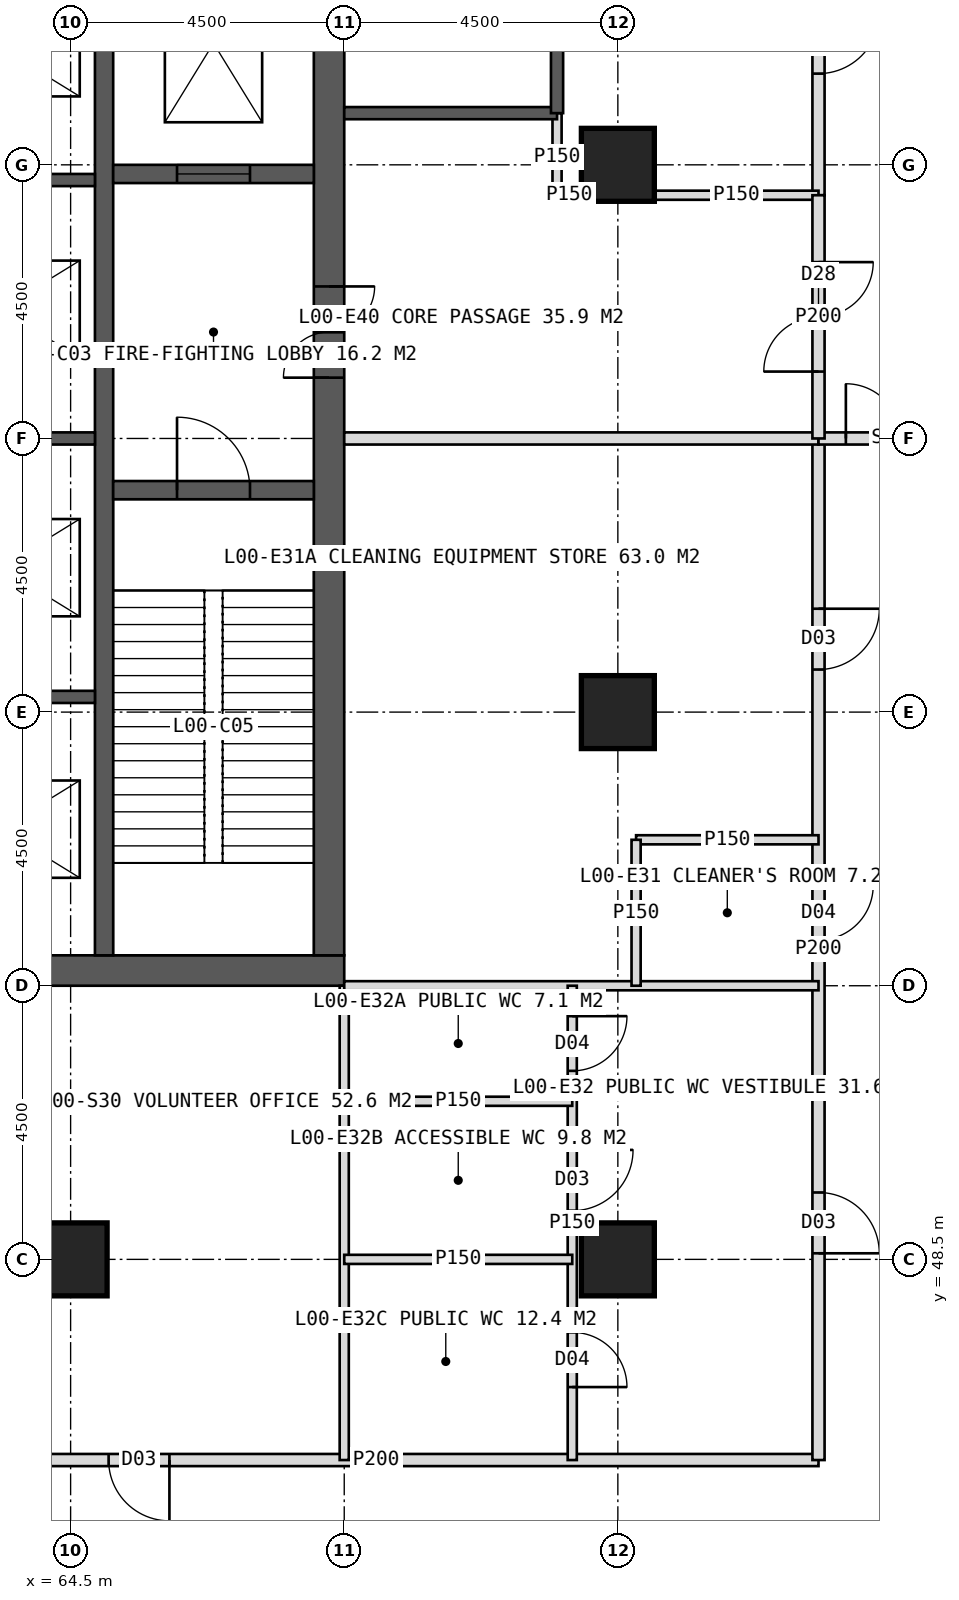
"""IFC4 building model, lengths in metres.
Left out: names, types, materials, properties, quantities, classifications, styles, units other than length and angle.
Written with IfcOpenShell. Run it as: python <this file> out.ifc"""

import sys

from ifc_helpers import new_model, si_unit, direction, frame, frame_2d, origin, origin_2d, place, context, subcontext, project, spatial, rectangle, hollow_rectangle, extrude, element, fill, save


model = new_model("IFC4")
c1 = context("Model", 3, precision=1e-05, world=origin(), true_north=direction((0.0, 1.0)))
c2 = subcontext(c1, "Body", "Model", "MODEL_VIEW")
j1 = project(units=[si_unit("LENGTHUNIT", "METRE"), si_unit("PLANEANGLEUNIT", "RADIAN")], contexts=[c1])
p1 = place(None, origin())
s1 = spatial("IfcSite", under=j1, at=p1, CompositionType="ELEMENT")
p2 = place(p1, origin())
s2 = spatial("IfcBuilding", under=s1, at=p2, CompositionType="ELEMENT")
p3 = place(p2, origin())
s3 = spatial("IfcBuildingStorey", under=s2, at=p3, CompositionType="ELEMENT", Elevation=0.0)
p4 = place(p3, frame((51.0, 53.25, 0.0), z_axis=(0.0, 0.0, 1.0), x_axis=(1.0, 0.0, 0.0)))
e1 = element("IfcWall", 1, at=p4, inside=s3, PredefinedType="SHEAR", context=c2, shape_type="SweptSolid", body=[
    extrude(rectangle(XDim=18.0, YDim=0.5, at=frame_2d((9.0, 0.0))), origin(), (0.0, 0.0, 1.0), 6.0),
])
p5 = place(p4, frame((8.1, 0.0, 0.0)))
e2 = element("IfcOpeningElement", 2, at=p5, cuts=e1, PredefinedType="OPENING", context=c2, shape_type="SweptSolid", body=[
    extrude(rectangle(XDim=1.8, YDim=2.2, at=frame_2d((0.9, 1.1))), frame((0.0, 0.26, 0.0), z_axis=(0.0, -1.0, 0.0), x_axis=(1.0, 0.0, 0.0)), (0.0, 0.0, 1.0), 0.52),
])
p6 = place(p3, frame((68.75, 53.5, 0.0), z_axis=(0.0, 0.0, 1.0), x_axis=(0.0, 1.0, 0.0)))
e3 = element("IfcWall", 3, at=p6, inside=s3, PredefinedType="SHEAR", context=c2, shape_type="SweptSolid", body=[
    extrude(rectangle(XDim=17.0, YDim=0.5, at=frame_2d((8.5, 0.0))), origin(), (0.0, 0.0, 1.0), 6.0),
])
p7 = place(p6, frame((9.5, 0.0, 0.0)))
e4 = element("IfcOpeningElement", 4, at=p7, cuts=e3, PredefinedType="OPENING", context=c2, shape_type="SweptSolid", body=[
    extrude(rectangle(XDim=1.5, YDim=2.2, at=frame_2d((0.75, 1.1))), frame((0.0, 0.26, 0.0), z_axis=(0.0, -1.0, 0.0), x_axis=(1.0, 0.0, 0.0)), (0.0, 0.0, 1.0), 0.52),
])
p8 = place(p3, frame((65.05, 53.5, 0.0), z_axis=(0.0, 0.0, 1.0), x_axis=(0.0, 1.0, 0.0)))
e5 = element("IfcWall", 5, at=p8, inside=s3, PredefinedType="SHEAR", context=c2, shape_type="SweptSolid", body=[
    extrude(rectangle(XDim=17.0, YDim=0.3, at=frame_2d((8.5, 0.0))), origin(), (0.0, 0.0, 1.0), 6.0),
])
for number, where, z_axis, x_axis in (
    (6, (61.85, 57.75, 0.0), (0.0, 0.0, 1.0), (1.0, 0.0, 0.0)),
    (7, (61.85, 62.0, 0.0), (0.0, 0.0, 1.0), (1.0, 0.0, 0.0)),
    (8, (61.85, 66.25, 0.0), (0.0, 0.0, 1.0), (1.0, 0.0, 0.0)),
):
    element("IfcWall", number, at=place(p3, frame(where, z_axis=z_axis, x_axis=x_axis)), inside=s3, PredefinedType="SHEAR", context=c2, shape_type="SweptSolid", body=[
        extrude(rectangle(XDim=3.05, YDim=0.2, at=frame_2d((1.525, 0.0))), origin(), (0.0, 0.0, 1.0), 6.0),
    ])
p9 = place(p3, frame((65.2, 61.15, 0.0), z_axis=(0.0, 0.0, 1.0), x_axis=(1.0, 0.0, 0.0)))
e9 = element("IfcWall", 9, at=p9, inside=s3, PredefinedType="SHEAR", context=c2, shape_type="SweptSolid", body=[
    extrude(rectangle(XDim=3.3, YDim=0.3, at=frame_2d((1.65, 0.0))), origin(), (0.0, 0.0, 1.0), 6.0),
])
p10 = place(p9, frame((1.05, 0.0, 0.0)))
e10 = element("IfcOpeningElement", 10, at=p10, cuts=e9, PredefinedType="OPENING", context=c2, shape_type="SweptSolid", body=[
    extrude(rectangle(XDim=1.2, YDim=2.1, at=frame_2d((0.6, 1.05))), frame((0.0, 0.16, 0.0), z_axis=(0.0, -1.0, 0.0), x_axis=(1.0, 0.0, 0.0)), (0.0, 0.0, 1.0), 0.32),
])
p11 = place(p3, frame((65.2, 66.35, 0.0), z_axis=(0.0, 0.0, 1.0), x_axis=(1.0, 0.0, 0.0)))
e11 = element("IfcWall", 11, at=p11, inside=s3, PredefinedType="SHEAR", context=c2, shape_type="SweptSolid", body=[
    extrude(rectangle(XDim=3.3, YDim=0.3, at=frame_2d((1.65, 0.0))), origin(), (0.0, 0.0, 1.0), 6.0),
])
p12 = place(p11, frame((1.05, 0.0, 0.0)))
e12 = element("IfcOpeningElement", 12, at=p12, cuts=e11, PredefinedType="OPENING", context=c2, shape_type="SweptSolid", body=[
    extrude(rectangle(XDim=1.2, YDim=2.2, at=frame_2d((0.6, 1.1))), frame((0.0, 0.16, 0.0), z_axis=(0.0, -1.0, 0.0), x_axis=(1.0, 0.0, 0.0)), (0.0, 0.0, 1.0), 0.32),
])
for number, where, z_axis, x_axis in (
    (13, (73.5, 48.5, 0.0), (0.0, 0.0, 1.0), (1.0, 0.0, 0.0)),
    (14, (64.5, 48.5, 0.0), (0.0, 0.0, 1.0), (1.0, 0.0, 0.0)),
    (15, (73.5, 57.5, 0.0), (0.0, 0.0, 1.0), (1.0, 0.0, 0.0)),
    (16, (73.5, 66.5, 0.0), (0.0, 0.0, 1.0), (1.0, 0.0, 0.0)),
):
    element("IfcColumn", number, at=place(p3, frame(where, z_axis=z_axis, x_axis=x_axis)), inside=s3, PredefinedType="COLUMN", context=c2, shape_type="SweptSolid", body=[
        extrude(hollow_rectangle(XDim=1.2, YDim=1.2, WallThickness=0.1, at=origin_2d()), origin(), (0.0, 0.0, 1.0), 6.0),
    ])
p13 = place(p3, frame((76.8, 45.2, 0.0), z_axis=(0.0, 0.0, 1.0), x_axis=(-1.0, 0.0, 0.0)))
e17 = element("IfcWall", 17, at=p13, inside=s3, PredefinedType="PARTITIONING", context=c2, shape_type="SweptSolid", body=[
    extrude(rectangle(XDim=14.55, YDim=0.2, at=frame_2d((7.275, 0.0))), origin(), (0.0, 0.0, 1.0), 5.7),
])
p14 = place(p13, frame((10.675, 0.0, 0.0)))
e18 = element("IfcOpeningElement", 18, at=p14, cuts=e17, PredefinedType="OPENING", context=c2, shape_type="SweptSolid", body=[
    extrude(rectangle(XDim=1.0, YDim=2.1, at=frame_2d((0.5, 1.05))), frame((0.0, 0.11, 0.0), z_axis=(0.0, -1.0, 0.0), x_axis=(1.0, 0.0, 0.0)), (0.0, 0.0, 1.0), 0.22),
])
p15 = place(p3, frame((69.0, 53.0, 0.0), z_axis=(0.0, 0.0, 1.0), x_axis=(0.0, -1.0, 0.0)))
e19 = element("IfcWall", 19, at=p15, inside=s3, PredefinedType="PARTITIONING", context=c2, shape_type="SweptSolid", body=[
    extrude(rectangle(XDim=7.8, YDim=0.15, at=frame_2d((3.9, 0.0))), origin(), (0.0, 0.0, 1.0), 5.7),
])
p16 = place(p3, frame((76.8, 78.8, 0.0), z_axis=(0.0, 0.0, 1.0), x_axis=(0.0, -1.0, 0.0)))
e20 = element("IfcWall", 20, at=p16, inside=s3, PredefinedType="PARTITIONING", context=c2, shape_type="SweptSolid", body=[
    extrude(rectangle(XDim=12.8, YDim=0.2, at=frame_2d((6.4, 0.0))), origin(), (0.0, 0.0, 1.0), 5.7),
])
p17 = place(p16, frame((9.8, 0.0, 0.0)))
e21 = element("IfcOpeningElement", 21, at=p17, cuts=e20, PredefinedType="OPENING", context=c2, shape_type="SweptSolid", body=[
    extrude(rectangle(XDim=1.0, YDim=2.1, at=frame_2d((0.5, 1.05))), frame((0.0, 0.11, 0.0), z_axis=(0.0, -1.0, 0.0), x_axis=(1.0, 0.0, 0.0)), (0.0, 0.0, 1.0), 0.22),
])
p18 = place(p3, frame((76.8, 62.0, 0.0), z_axis=(0.0, 0.0, 1.0), x_axis=(0.0, -1.0, 0.0)))
e22 = element("IfcWall", 22, at=p18, inside=s3, PredefinedType="PARTITIONING", context=c2, shape_type="SweptSolid", body=[
    extrude(rectangle(XDim=16.8, YDim=0.2, at=frame_2d((8.4, 0.0))), origin(), (0.0, 0.0, 1.0), 5.7),
])
p19 = place(p18, frame((12.4, 0.0, 0.0)))
e23 = element("IfcOpeningElement", 23, at=p19, cuts=e22, PredefinedType="OPENING", context=c2, shape_type="SweptSolid", body=[
    extrude(rectangle(XDim=1.0, YDim=2.1, at=frame_2d((0.5, 1.05))), frame((0.0, 0.11, 0.0), z_axis=(0.0, -1.0, 0.0), x_axis=(1.0, 0.0, 0.0)), (0.0, 0.0, 1.0), 0.22),
])
p20 = place(p18, frame((7.35, 0.0, 0.0)))
e24 = element("IfcOpeningElement", 24, at=p20, cuts=e22, PredefinedType="OPENING", context=c2, shape_type="SweptSolid", body=[
    extrude(rectangle(XDim=0.9, YDim=2.1, at=frame_2d((0.45, 1.05))), frame((0.0, 0.11, 0.0), z_axis=(0.0, -1.0, 0.0), x_axis=(1.0, 0.0, 0.0)), (0.0, 0.0, 1.0), 0.22),
])
p21 = place(p18, frame((2.8, 0.0, 0.0)))
e25 = element("IfcOpeningElement", 25, at=p21, cuts=e22, PredefinedType="OPENING", context=c2, shape_type="SweptSolid", body=[
    extrude(rectangle(XDim=1.0, YDim=2.1, at=frame_2d((0.5, 1.05))), frame((0.0, 0.11, 0.0), z_axis=(0.0, -1.0, 0.0), x_axis=(1.0, 0.0, 0.0)), (0.0, 0.0, 1.0), 0.22),
])
p22 = place(p3, frame((72.5, 66.0, 0.0), z_axis=(0.0, 0.0, 1.0), x_axis=(1.0, 0.0, 0.0)))
e26 = element("IfcWall", 26, at=p22, inside=s3, PredefinedType="PARTITIONING", context=c2, shape_type="SweptSolid", body=[
    extrude(rectangle(XDim=0.4, YDim=0.15, at=frame_2d((0.2, 0.0))), origin(), (0.0, 0.0, 1.0), 5.7),
])
p23 = place(p3, frame((74.1, 66.0, 0.0), z_axis=(0.0, 0.0, 1.0), x_axis=(1.0, 0.0, 0.0)))
e27 = element("IfcWall", 27, at=p23, inside=s3, PredefinedType="PARTITIONING", context=c2, shape_type="SweptSolid", body=[
    extrude(rectangle(XDim=2.7, YDim=0.15, at=frame_2d((1.35, 0.0))), origin(), (0.0, 0.0, 1.0), 5.7),
])
p24 = place(p3, frame((69.0, 62.0, 0.0), z_axis=(0.0, 0.0, 1.0), x_axis=(1.0, 0.0, 0.0)))
e28 = element("IfcWall", 28, at=p24, inside=s3, PredefinedType="SOLIDWALL", context=c2, shape_type="SweptSolid", body=[
    extrude(rectangle(XDim=7.8, YDim=0.2, at=frame_2d((3.9, 0.0))), origin(), (0.0, 0.0, 1.0), 4.9),
])
p25 = place(p3, frame((69.0, 53.0, 0.0), z_axis=(0.0, 0.0, 1.0), x_axis=(1.0, 0.0, 0.0)))
e29 = element("IfcWall", 29, at=p25, inside=s3, PredefinedType="PARTITIONING", context=c2, shape_type="SweptSolid", body=[
    extrude(rectangle(XDim=7.8, YDim=0.15, at=frame_2d((3.9, 0.0))), origin(), (0.0, 0.0, 1.0), 5.7),
])
p26 = place(p3, frame((73.8, 55.4, 0.0), z_axis=(0.0, 0.0, 1.0), x_axis=(1.0, 0.0, 0.0)))
e30 = element("IfcWall", 30, at=p26, inside=s3, PredefinedType="PARTITIONING", context=c2, shape_type="SweptSolid", body=[
    extrude(rectangle(XDim=3.0, YDim=0.15, at=frame_2d((1.5, 0.0))), origin(), (0.0, 0.0, 1.0), 5.7),
])
p27 = place(p3, frame((73.8, 55.4, 0.0), z_axis=(0.0, 0.0, 1.0), x_axis=(0.0, -1.0, 0.0)))
e31 = element("IfcWall", 31, at=p27, inside=s3, PredefinedType="PARTITIONING", context=c2, shape_type="SweptSolid", body=[
    extrude(rectangle(XDim=2.4, YDim=0.15, at=frame_2d((1.2, 0.0))), origin(), (0.0, 0.0, 1.0), 5.7),
])
p28 = place(p3, frame((72.75, 53.0, 0.0), z_axis=(0.0, 0.0, 1.0), x_axis=(0.0, -1.0, 0.0)))
e32 = element("IfcWall", 32, at=p28, inside=s3, PredefinedType="PARTITIONING", context=c2, shape_type="SweptSolid", body=[
    extrude(rectangle(XDim=7.8, YDim=0.15, at=frame_2d((3.9, 0.0))), origin(), (0.0, 0.0, 1.0), 5.7),
])
p29 = place(p28, frame((0.5, 0.0, 0.0)))
e33 = element("IfcOpeningElement", 33, at=p29, cuts=e32, PredefinedType="OPENING", context=c2, shape_type="SweptSolid", body=[
    extrude(rectangle(XDim=0.9, YDim=2.1, at=frame_2d((0.45, 1.05))), frame((0.0, 0.085, 0.0), z_axis=(0.0, -1.0, 0.0), x_axis=(1.0, 0.0, 0.0)), (0.0, 0.0, 1.0), 0.17),
])
p30 = place(p28, frame((2.7, 0.0, 0.0)))
e34 = element("IfcOpeningElement", 34, at=p30, cuts=e32, PredefinedType="OPENING", context=c2, shape_type="SweptSolid", body=[
    extrude(rectangle(XDim=1.0, YDim=2.1, at=frame_2d((0.5, 1.05))), frame((0.0, 0.085, 0.0), z_axis=(0.0, -1.0, 0.0), x_axis=(1.0, 0.0, 0.0)), (0.0, 0.0, 1.0), 0.17),
])
p31 = place(p28, frame((5.7, 0.0, 0.0)))
e35 = element("IfcOpeningElement", 35, at=p31, cuts=e32, PredefinedType="OPENING", context=c2, shape_type="SweptSolid", body=[
    extrude(rectangle(XDim=0.9, YDim=2.1, at=frame_2d((0.45, 1.05))), frame((0.0, 0.085, 0.0), z_axis=(0.0, -1.0, 0.0), x_axis=(1.0, 0.0, 0.0)), (0.0, 0.0, 1.0), 0.17),
])
p32 = place(p3, frame((69.0, 51.1, 0.0), z_axis=(0.0, 0.0, 1.0), x_axis=(1.0, 0.0, 0.0)))
e36 = element("IfcWall", 36, at=p32, inside=s3, PredefinedType="PARTITIONING", context=c2, shape_type="SweptSolid", body=[
    extrude(rectangle(XDim=3.75, YDim=0.15, at=frame_2d((1.875, 0.0))), origin(), (0.0, 0.0, 1.0), 5.7),
])
p33 = place(p3, frame((69.0, 48.5, 0.0), z_axis=(0.0, 0.0, 1.0), x_axis=(1.0, 0.0, 0.0)))
e37 = element("IfcWall", 37, at=p33, inside=s3, PredefinedType="PARTITIONING", context=c2, shape_type="SweptSolid", body=[
    extrude(rectangle(XDim=3.75, YDim=0.15, at=frame_2d((1.875, 0.0))), origin(), (0.0, 0.0, 1.0), 4.9),
])
p34 = place(p3, frame((76.8, 62.0, 0.0), z_axis=(0.0, 0.0, 1.0), x_axis=(1.0, 0.0, 0.0)))
e38 = element("IfcWall", 38, at=p34, inside=s3, PredefinedType="SOLIDWALL", context=c2, shape_type="SweptSolid", body=[
    extrude(rectangle(XDim=2.7, YDim=0.2, at=frame_2d((1.35, 0.0))), origin(), (0.0, 0.0, 1.0), 4.9),
])
p35 = place(p34, frame((0.45, 0.0, 0.0)))
e39 = element("IfcOpeningElement", 39, at=p35, cuts=e38, PredefinedType="OPENING", context=c2, shape_type="SweptSolid", body=[
    extrude(rectangle(XDim=1.8, YDim=2.2, at=frame_2d((0.9, 1.1))), frame((0.0, 0.11, 0.0), z_axis=(0.0, -1.0, 0.0), x_axis=(1.0, 0.0, 0.0)), (0.0, 0.0, 1.0), 0.22),
])
p36 = place(p3, frame((72.5, 65.9, 0.0), z_axis=(0.0, 0.0, 1.0), x_axis=(0.0, 1.0, 0.0)))
e40 = element("IfcWall", 40, at=p36, inside=s3, PredefinedType="PARTITIONING", context=c2, shape_type="SweptSolid", body=[
    extrude(rectangle(XDim=1.45, YDim=0.15, at=frame_2d((0.725, 0.0))), origin(), (0.0, 0.0, 1.0), 5.7),
])
p37 = place(p3, frame((69.0, 67.35, 0.0), z_axis=(0.0, 0.0, 1.0), x_axis=(1.0, 0.0, 0.0)))
e41 = element("IfcWall", 41, at=p37, inside=s3, PredefinedType="SOLIDWALL", context=c2, shape_type="SweptSolid", body=[
    extrude(rectangle(XDim=3.5, YDim=0.2, at=frame_2d((1.75, 0.0))), origin(), (0.0, 0.0, 1.0), 5.7),
])
p38 = place(p3, frame((72.5, 67.35, 0.0), z_axis=(0.0, 0.0, 1.0), x_axis=(0.0, 1.0, 0.0)))
e42 = element("IfcWall", 42, at=p38, inside=s3, PredefinedType="SOLIDWALL", context=c2, shape_type="SweptSolid", body=[
    extrude(rectangle(XDim=7.75, YDim=0.2, at=frame_2d((3.875, 0.0))), origin(), (0.0, 0.0, 1.0), 5.7),
])
p39 = place(p3, frame((76.8, 66.0, 0.0), z_axis=(0.0, 0.0, 1.0), x_axis=(0.0, -1.0, 0.0)))
e43 = element("IfcWall", 43, at=p39, inside=s3, PredefinedType="PARTITIONING", context=c2, shape_type="SweptSolid", body=[
    extrude(rectangle(XDim=4.0, YDim=0.2, at=frame_2d((2.0, 0.0))), origin(), (0.0, 0.0, 1.0), 5.7),
])
p40 = place(p39, frame((1.1, 0.0, 0.0)))
e44 = element("IfcOpeningElement", 44, at=p40, cuts=e43, PredefinedType="OPENING", context=c2, shape_type="SweptSolid", body=[
    extrude(rectangle(XDim=1.8, YDim=2.2, at=frame_2d((0.9, 1.1))), frame((0.0, 0.11, 0.0), z_axis=(0.0, -1.0, 0.0), x_axis=(1.0, 0.0, 0.0)), (0.0, 0.0, 1.0), 0.22),
])
p41 = place(p14, origin())
e45 = element("IfcDoor", 45, at=p41, inside=s3, OperationType="SINGLE_SWING_LEFT", PredefinedType="DOOR", context=c2, shape_type="SweptSolid", body=[
    extrude(rectangle(XDim=1.0, YDim=2.1, at=frame_2d((0.5, 1.05))), frame((0.0, 0.025, 0.0), z_axis=(0.0, -1.0, 0.0), x_axis=(1.0, 0.0, 0.0)), (0.0, 0.0, 1.0), 0.05),
])
fill(e18, e45)
p42 = place(p17, origin())
e46 = element("IfcDoor", 46, at=p42, inside=s3, OperationType="SINGLE_SWING_LEFT", PredefinedType="DOOR", context=c2, shape_type="SweptSolid", body=[
    extrude(rectangle(XDim=1.0, YDim=2.1, at=frame_2d((0.5, 1.05))), frame((0.0, 0.025, 0.0), z_axis=(0.0, -1.0, 0.0), x_axis=(1.0, 0.0, 0.0)), (0.0, 0.0, 1.0), 0.05),
])
fill(e21, e46)
p43 = place(p19, origin())
e47 = element("IfcDoor", 47, at=p43, inside=s3, OperationType="SINGLE_SWING_RIGHT", PredefinedType="DOOR", context=c2, shape_type="SweptSolid", body=[
    extrude(rectangle(XDim=1.0, YDim=2.1, at=frame_2d((0.5, 1.05))), frame((0.0, 0.025, 0.0), z_axis=(0.0, -1.0, 0.0), x_axis=(1.0, 0.0, 0.0)), (0.0, 0.0, 1.0), 0.05),
])
fill(e23, e47)
p44 = place(p35, origin())
e48 = element("IfcDoor", 48, at=p44, inside=s3, OperationType="DOUBLE_DOOR_DOUBLE_SWING", PredefinedType="DOOR", context=c2, shape_type="SweptSolid", body=[
    extrude(rectangle(XDim=1.8, YDim=2.2, at=frame_2d((0.9, 1.1))), frame((0.0, 0.025, 0.0), z_axis=(0.0, -1.0, 0.0), x_axis=(1.0, 0.0, 0.0)), (0.0, 0.0, 1.0), 0.05),
])
fill(e39, e48)
p45 = place(p7, origin())
e49 = element("IfcDoor", 49, at=p45, inside=s3, OperationType="DOUBLE_DOOR_SINGLE_SWING", PredefinedType="DOOR", context=c2, shape_type="SweptSolid", body=[
    extrude(rectangle(XDim=1.5, YDim=2.2, at=frame_2d((0.75, 1.1))), frame((0.0, 0.025, 0.0), z_axis=(0.0, -1.0, 0.0), x_axis=(1.0, 0.0, 0.0)), (0.0, 0.0, 1.0), 0.05),
])
fill(e4, e49)
p46 = place(p10, origin())
e50 = element("IfcDoor", 50, at=p46, inside=s3, OperationType="SINGLE_SWING_LEFT", PredefinedType="DOOR", context=c2, shape_type="SweptSolid", body=[
    extrude(rectangle(XDim=1.2, YDim=2.1, at=frame_2d((0.6, 1.05))), frame((0.0, 0.025, 0.0), z_axis=(0.0, -1.0, 0.0), x_axis=(1.0, 0.0, 0.0)), (0.0, 0.0, 1.0), 0.05),
])
fill(e10, e50)
p47 = place(p12, origin())
e51 = element("IfcDoor", 51, at=p47, inside=s3, OperationType="SLIDING_TO_LEFT", PredefinedType="DOOR", context=c2, shape_type="SweptSolid", body=[
    extrude(rectangle(XDim=1.2, YDim=2.2, at=frame_2d((0.6, 1.1))), frame((0.0, 0.025, 0.0), z_axis=(0.0, -1.0, 0.0), x_axis=(1.0, 0.0, 0.0)), (0.0, 0.0, 1.0), 0.05),
])
fill(e12, e51)
p48 = place(p20, origin())
e52 = element("IfcDoor", 52, at=p48, inside=s3, OperationType="SINGLE_SWING_LEFT", PredefinedType="DOOR", context=c2, shape_type="SweptSolid", body=[
    extrude(rectangle(XDim=0.9, YDim=2.1, at=frame_2d((0.45, 1.05))), frame((0.0, 0.025, 0.0), z_axis=(0.0, -1.0, 0.0), x_axis=(1.0, 0.0, 0.0)), (0.0, 0.0, 1.0), 0.05),
])
fill(e24, e52)
p49 = place(p21, origin())
e53 = element("IfcDoor", 53, at=p49, inside=s3, OperationType="SINGLE_SWING_LEFT", PredefinedType="DOOR", context=c2, shape_type="SweptSolid", body=[
    extrude(rectangle(XDim=1.0, YDim=2.1, at=frame_2d((0.5, 1.05))), frame((0.0, 0.025, 0.0), z_axis=(0.0, -1.0, 0.0), x_axis=(1.0, 0.0, 0.0)), (0.0, 0.0, 1.0), 0.05),
])
fill(e25, e53)
p50 = place(p29, origin())
e54 = element("IfcDoor", 54, at=p50, inside=s3, OperationType="SINGLE_SWING_LEFT", PredefinedType="DOOR", context=c2, shape_type="SweptSolid", body=[
    extrude(rectangle(XDim=0.9, YDim=2.1, at=frame_2d((0.45, 1.05))), frame((0.0, 0.025, 0.0), z_axis=(0.0, -1.0, 0.0), x_axis=(1.0, 0.0, 0.0)), (0.0, 0.0, 1.0), 0.05),
])
fill(e33, e54)
p51 = place(p30, origin())
e55 = element("IfcDoor", 55, at=p51, inside=s3, OperationType="SINGLE_SWING_LEFT", PredefinedType="DOOR", context=c2, shape_type="SweptSolid", body=[
    extrude(rectangle(XDim=1.0, YDim=2.1, at=frame_2d((0.5, 1.05))), frame((0.0, 0.025, 0.0), z_axis=(0.0, -1.0, 0.0), x_axis=(1.0, 0.0, 0.0)), (0.0, 0.0, 1.0), 0.05),
])
fill(e34, e55)
p52 = place(p31, origin())
e56 = element("IfcDoor", 56, at=p52, inside=s3, OperationType="SINGLE_SWING_RIGHT", PredefinedType="DOOR", context=c2, shape_type="SweptSolid", body=[
    extrude(rectangle(XDim=0.9, YDim=2.1, at=frame_2d((0.45, 1.05))), frame((0.0, 0.025, 0.0), z_axis=(0.0, -1.0, 0.0), x_axis=(1.0, 0.0, 0.0)), (0.0, 0.0, 1.0), 0.05),
])
fill(e35, e56)
p53 = place(p40, origin())
e57 = element("IfcDoor", 57, at=p53, inside=s3, OperationType="DOUBLE_DOOR_SINGLE_SWING", PredefinedType="DOOR", context=c2, shape_type="SweptSolid", body=[
    extrude(rectangle(XDim=1.8, YDim=2.2, at=frame_2d((0.9, 1.1))), frame((0.0, 0.025, 0.0), z_axis=(0.0, -1.0, 0.0), x_axis=(1.0, 0.0, 0.0)), (0.0, 0.0, 1.0), 0.05),
])
fill(e44, e57)
save(model, sys.argv[1])
